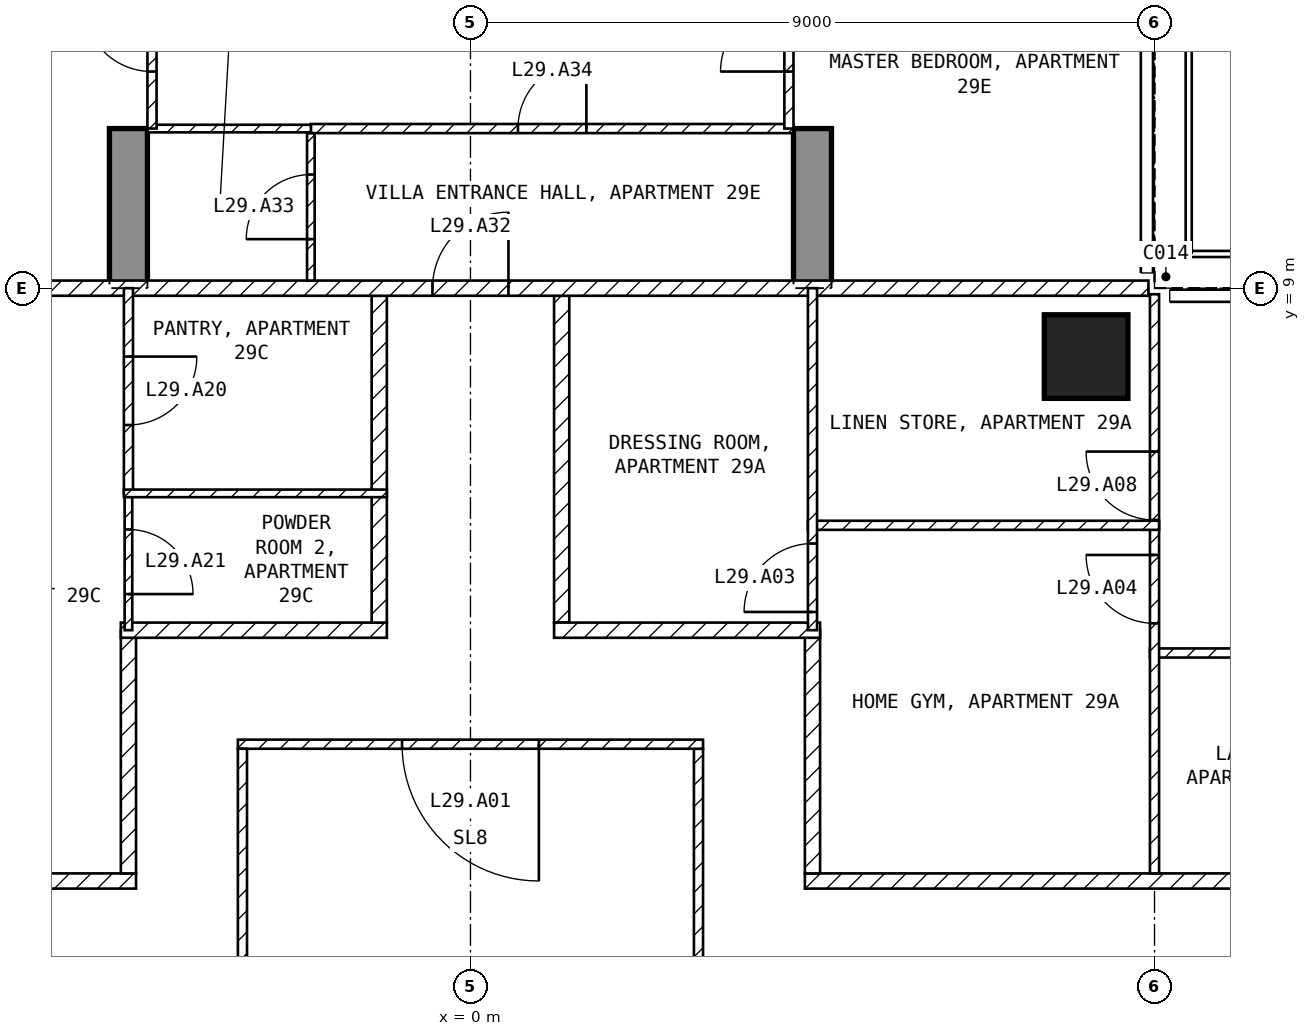
"""IFC4 building model, lengths in metres.
Left out: names, types, materials, properties, quantities, classifications, styles, units other than length and angle.
Written with IfcOpenShell. Run it as: python <this file> out.ifc"""

import sys

from ifc_helpers import new_model, si_unit, direction, frame, frame_2d, origin, origin_2d, place, context, subcontext, project, spatial, polyline, rectangle, outline, extrude, element, fill, save


model = new_model("IFC4")
c1 = context("Model", 3, precision=1e-05, world=origin(), true_north=direction((0.0, 1.0)))
c2 = subcontext(c1, "Body", "Model", "MODEL_VIEW")
j1 = project(units=[si_unit("LENGTHUNIT", "METRE"), si_unit("PLANEANGLEUNIT", "RADIAN")], contexts=[c1])
p1 = place(None, origin())
s1 = spatial("IfcSite", under=j1, at=p1, CompositionType="ELEMENT")
p2 = place(p1, origin())
s2 = spatial("IfcBuilding", under=s1, at=p2, CompositionType="ELEMENT")
p3 = place(p2, frame((0.0, 0.0, 123.4)))
s3 = spatial("IfcBuildingStorey", under=s2, at=p3, CompositionType="ELEMENT", Elevation=123.4)
p4 = place(p3, frame((8.1, 8.1, -0.25), z_axis=(0.0, 0.0, 1.0), x_axis=(1.0, 0.0, 0.0)))
e1 = element("IfcColumn", 1, at=p4, inside=s3, PredefinedType="COLUMN", context=c2, shape_type="SweptSolid", body=[
    extrude(rectangle(XDim=1.1, YDim=1.1, at=origin_2d()), origin(), (0.0, 0.0, 1.0), 3.5),
])
for number, where, z_axis, x_axis in (
    (2, (-4.75, 9.0, -0.25), (1.0, 0.0, 0.0), (0.0, 1.0, 0.0)),
    (3, (4.25, 9.0, -0.25), (1.0, 0.0, 0.0), (0.0, 1.0, 0.0)),
):
    element("IfcWall", number, at=place(p3, frame(where, z_axis=z_axis, x_axis=x_axis)), inside=s3, PredefinedType="SHEAR", context=c2, shape_type="SweptSolid", body=[
        extrude(outline(polyline([(0.0, 0.0), (2.1, 0.0), (2.1, 2.65), (4.5, 2.65), (4.5, 0.0), (9.9, 0.0), (9.9, 2.65), (12.3, 2.65), (12.3, 0.0), (16.55, 0.0), (16.55, 3.5), (0.0, 3.5), (0.0, 0.0)])), origin(), (0.0, 0.0, 1.0), 0.5),
    ])
p5 = place(p3, frame((3.0, -2.94, 0.0), z_axis=(0.0, 0.0, 1.0), x_axis=(0.0, 1.0, 0.0)))
e4 = element("IfcWall", 4, at=p5, inside=s3, PredefinedType="PARTITIONING", context=c2, shape_type="SweptSolid", body=[
    extrude(rectangle(XDim=5.88, YDim=0.12, at=frame_2d((2.94, 0.0))), origin(), (0.0, 0.0, 1.0), 3.25),
])
p6 = place(p3, frame((3.06, 3.0, 0.0), z_axis=(0.0, 0.0, 1.0), x_axis=(-1.0, 0.0, 0.0)))
e5 = element("IfcWall", 5, at=p6, inside=s3, PredefinedType="PARTITIONING", context=c2, shape_type="SweptSolid", body=[
    extrude(rectangle(XDim=6.12, YDim=0.12, at=frame_2d((3.06, 0.0))), origin(), (0.0, 0.0, 1.0), 3.25),
])
p7 = place(p6, frame((2.16, 0.0, 0.0)))
e6 = element("IfcOpeningElement", 6, at=p7, cuts=e5, PredefinedType="OPENING", context=c2, shape_type="SweptSolid", body=[
    extrude(rectangle(XDim=1.8, YDim=2.1, at=frame_2d((0.9, 1.05))), frame((0.0, 0.07, 0.0), z_axis=(0.0, -1.0, 0.0), x_axis=(1.0, 0.0, 0.0)), (0.0, 0.0, 1.0), 0.14),
])
p8 = place(p3, frame((-3.0, 2.94, 0.0), z_axis=(0.0, 0.0, 1.0), x_axis=(0.0, -1.0, 0.0)))
e7 = element("IfcWall", 7, at=p8, inside=s3, PredefinedType="PARTITIONING", context=c2, shape_type="SweptSolid", body=[
    extrude(rectangle(XDim=5.88, YDim=0.12, at=frame_2d((2.94, 0.0))), origin(), (0.0, 0.0, 1.0), 3.25),
])
p9 = place(p3, frame((4.4, 1.2, 0.0), z_axis=(0.0, 0.0, 1.0), x_axis=(1.0, 0.0, 0.0)))
e8 = element("IfcWall", 8, at=p9, inside=s3, PredefinedType="PARTITIONING", context=c2, shape_type="SweptSolid", body=[
    extrude(rectangle(XDim=17.2, YDim=0.2, at=frame_2d((8.6, 0.0))), origin(), (0.0, 0.0, 1.0), 3.25),
])
p10 = place(p9, frame((8.45, 0.0, 0.0)))
e9 = element("IfcOpeningElement", 9, at=p10, cuts=e8, PredefinedType="OPENING", context=c2, shape_type="SweptSolid", body=[
    extrude(rectangle(XDim=1.0, YDim=2.1, at=frame_2d((0.5, 1.05))), frame((0.0, 0.11, 0.0), z_axis=(0.0, -1.0, 0.0), x_axis=(1.0, 0.0, 0.0)), (0.0, 0.0, 1.0), 0.22),
])
p11 = place(p3, frame((4.5, 4.5, 0.0), z_axis=(0.0, 0.0, 1.0), x_axis=(0.0, -1.0, 0.0)))
e10 = element("IfcWall", 10, at=p11, inside=s3, PredefinedType="PARTITIONING", context=c2, shape_type="SweptSolid", body=[
    extrude(rectangle(XDim=3.2, YDim=0.2, at=frame_2d((1.6, 0.0))), origin(), (0.0, 0.0, 1.0), 3.25),
])
p12 = place(p3, frame((1.2, 8.9, 0.0), z_axis=(0.0, 0.0, 1.0), x_axis=(0.0, -1.0, 0.0)))
e11 = element("IfcWall", 11, at=p12, inside=s3, PredefinedType="PARTITIONING", context=c2, shape_type="SweptSolid", body=[
    extrude(rectangle(XDim=4.3, YDim=0.2, at=frame_2d((2.15, 0.0))), origin(), (0.0, 0.0, 1.0), 3.25),
])
p13 = place(p3, frame((1.1, 4.5, 0.0), z_axis=(0.0, 0.0, 1.0), x_axis=(1.0, 0.0, 0.0)))
e12 = element("IfcWall", 12, at=p13, inside=s3, PredefinedType="PARTITIONING", context=c2, shape_type="SweptSolid", body=[
    extrude(rectangle(XDim=3.5, YDim=0.2, at=frame_2d((1.75, 0.0))), origin(), (0.0, 0.0, 1.0), 3.25),
])
p14 = place(p3, frame((-21.6, 1.2, 0.0), z_axis=(0.0, 0.0, 1.0), x_axis=(1.0, 0.0, 0.0)))
e13 = element("IfcWall", 13, at=p14, inside=s3, PredefinedType="PARTITIONING", context=c2, shape_type="SweptSolid", body=[
    extrude(rectangle(XDim=17.2, YDim=0.2, at=frame_2d((8.6, 0.0))), origin(), (0.0, 0.0, 1.0), 3.25),
])
p15 = place(p14, frame((10.9, 0.0, 0.0)))
e14 = element("IfcOpeningElement", 14, at=p15, cuts=e13, PredefinedType="OPENING", context=c2, shape_type="SweptSolid", body=[
    extrude(rectangle(XDim=1.0, YDim=2.1, at=frame_2d((0.5, 1.05))), frame((0.0, 0.11, 0.0), z_axis=(0.0, -1.0, 0.0), x_axis=(1.0, 0.0, 0.0)), (0.0, 0.0, 1.0), 0.22),
])
p16 = place(p3, frame((-4.5, 1.3, 0.0), z_axis=(0.0, 0.0, 1.0), x_axis=(0.0, 1.0, 0.0)))
e15 = element("IfcWall", 15, at=p16, inside=s3, PredefinedType="PARTITIONING", context=c2, shape_type="SweptSolid", body=[
    extrude(rectangle(XDim=3.2, YDim=0.2, at=frame_2d((1.6, 0.0))), origin(), (0.0, 0.0, 1.0), 3.25),
])
p17 = place(p3, frame((-4.6, 4.5, 0.0), z_axis=(0.0, 0.0, 1.0), x_axis=(1.0, 0.0, 0.0)))
e16 = element("IfcWall", 16, at=p17, inside=s3, PredefinedType="PARTITIONING", context=c2, shape_type="SweptSolid", body=[
    extrude(rectangle(XDim=3.5, YDim=0.2, at=frame_2d((1.75, 0.0))), origin(), (0.0, 0.0, 1.0), 3.25),
])
p18 = place(p3, frame((-1.2, 4.6, 0.0), z_axis=(0.0, 0.0, 1.0), x_axis=(0.0, 1.0, 0.0)))
e17 = element("IfcWall", 17, at=p18, inside=s3, PredefinedType="PARTITIONING", context=c2, shape_type="SweptSolid", body=[
    extrude(rectangle(XDim=4.3, YDim=0.2, at=frame_2d((2.15, 0.0))), origin(), (0.0, 0.0, 1.0), 3.25),
])
p19 = place(p3, frame((-8.92, 9.0, 0.0), z_axis=(0.0, 0.0, 1.0), x_axis=(1.0, 0.0, 0.0)))
e18 = element("IfcWall", 18, at=p19, inside=s3, PredefinedType="PARTITIONING", context=c2, shape_type="SweptSolid", body=[
    extrude(rectangle(XDim=17.84, YDim=0.2, at=frame_2d((8.92, 0.0))), origin(), (0.0, 0.0, 1.0), 3.25),
])
p20 = place(p19, frame((8.42, 0.0, 0.0)))
e19 = element("IfcOpeningElement", 19, at=p20, cuts=e18, PredefinedType="OPENING", context=c2, shape_type="SweptSolid", body=[
    extrude(rectangle(XDim=1.0, YDim=2.1, at=frame_2d((0.5, 1.05))), frame((0.0, 0.11, 0.0), z_axis=(0.0, -1.0, 0.0), x_axis=(1.0, 0.0, 0.0)), (0.0, 0.0, 1.0), 0.22),
])
p21 = place(p3, frame((8.94, 4.2, 0.0), z_axis=(0.0, 0.0, 1.0), x_axis=(1.0, 0.0, 0.0)))
e20 = element("IfcWall", 20, at=p21, inside=s3, PredefinedType="PARTITIONING", context=c2, shape_type="SweptSolid", body=[
    extrude(rectangle(XDim=10.71, YDim=0.12, at=frame_2d((5.355, 0.0))), origin(), (0.0, 0.0, 1.0), 3.25),
])
p22 = place(p21, frame((3.96, 0.0, 0.0)))
e21 = element("IfcOpeningElement", 21, at=p22, cuts=e20, PredefinedType="OPENING", context=c2, shape_type="SweptSolid", body=[
    extrude(rectangle(XDim=0.9, YDim=2.1, at=frame_2d((0.45, 1.05))), frame((0.0, 0.07, 0.0), z_axis=(0.0, -1.0, 0.0), x_axis=(1.0, 0.0, 0.0)), (0.0, 0.0, 1.0), 0.14),
])
p23 = place(p3, frame((9.0, 1.3, 0.0), z_axis=(0.0, 0.0, 1.0), x_axis=(0.0, 1.0, 0.0)))
e22 = element("IfcWall", 22, at=p23, inside=s3, PredefinedType="PARTITIONING", context=c2, shape_type="SweptSolid", body=[
    extrude(rectangle(XDim=7.62, YDim=0.12, at=frame_2d((3.81, 0.0))), origin(), (0.0, 0.0, 1.0), 3.25),
])
p24 = place(p23, frame((3.29, 0.0, 0.0)))
e23 = element("IfcOpeningElement", 23, at=p24, cuts=e22, PredefinedType="OPENING", context=c2, shape_type="SweptSolid", body=[
    extrude(rectangle(XDim=0.9, YDim=2.1, at=frame_2d((0.45, 1.05))), frame((0.0, 0.07, 0.0), z_axis=(0.0, -1.0, 0.0), x_axis=(1.0, 0.0, 0.0)), (0.0, 0.0, 1.0), 0.14),
])
p25 = place(p23, frame((4.65, 0.0, 0.0)))
e24 = element("IfcOpeningElement", 24, at=p25, cuts=e22, PredefinedType="OPENING", context=c2, shape_type="SweptSolid", body=[
    extrude(rectangle(XDim=0.9, YDim=2.1, at=frame_2d((0.45, 1.05))), frame((0.0, 0.07, 0.0), z_axis=(0.0, -1.0, 0.0), x_axis=(1.0, 0.0, 0.0)), (0.0, 0.0, 1.0), 0.14),
])
p26 = place(p3, frame((4.44, 5.88, 0.0), z_axis=(0.0, 0.0, 1.0), x_axis=(1.0, 0.0, 0.0)))
e25 = element("IfcWall", 25, at=p26, inside=s3, PredefinedType="PARTITIONING", context=c2, shape_type="SweptSolid", body=[
    extrude(rectangle(XDim=4.62, YDim=0.12, at=frame_2d((2.31, 0.0))), origin(), (0.0, 0.0, 1.0), 3.25),
])
p27 = place(p3, frame((4.5, 4.5, 0.0), z_axis=(0.0, 0.0, 1.0), x_axis=(0.0, 1.0, 0.0)))
e26 = element("IfcWall", 26, at=p27, inside=s3, PredefinedType="PARTITIONING", context=c2, shape_type="SweptSolid", body=[
    extrude(rectangle(XDim=4.5, YDim=0.12, at=frame_2d((2.25, 0.0))), origin(), (0.0, 0.0, 1.0), 3.25),
])
p28 = place(p27, frame((0.24, 0.0, 0.0)))
e27 = element("IfcOpeningElement", 27, at=p28, cuts=e26, PredefinedType="OPENING", context=c2, shape_type="SweptSolid", body=[
    extrude(rectangle(XDim=0.9, YDim=2.1, at=frame_2d((0.45, 1.05))), frame((0.0, 0.07, 0.0), z_axis=(0.0, -1.0, 0.0), x_axis=(1.0, 0.0, 0.0)), (0.0, 0.0, 1.0), 0.14),
])
p29 = place(p3, frame((-4.5, 6.3, 0.0), z_axis=(0.0, 0.0, 1.0), x_axis=(0.0, -1.0, 0.0)))
e28 = element("IfcWall", 28, at=p29, inside=s3, PredefinedType="PARTITIONING", context=c2, shape_type="SweptSolid", body=[
    extrude(rectangle(XDim=1.8, YDim=0.1, at=frame_2d((0.9, 0.0))), origin(), (0.0, 0.0, 1.0), 3.25),
])
p30 = place(p29, frame((0.475, 0.0, 0.0)))
e29 = element("IfcOpeningElement", 29, at=p30, cuts=e28, PredefinedType="OPENING", context=c2, shape_type="SweptSolid", body=[
    extrude(rectangle(XDim=0.85, YDim=2.1, at=frame_2d((0.425, 1.05))), frame((0.0, 0.06, 0.0), z_axis=(0.0, -1.0, 0.0), x_axis=(1.0, 0.0, 0.0)), (0.0, 0.0, 1.0), 0.12),
])
p31 = place(p3, frame((-4.5, 9.0, 0.0), z_axis=(0.0, 0.0, 1.0), x_axis=(0.0, -1.0, 0.0)))
e30 = element("IfcWall", 30, at=p31, inside=s3, PredefinedType="PARTITIONING", context=c2, shape_type="SweptSolid", body=[
    extrude(rectangle(XDim=2.7, YDim=0.12, at=frame_2d((1.35, 0.0))), origin(), (0.0, 0.0, 1.0), 3.25),
])
p32 = place(p31, frame((0.9, 0.0, 0.0)))
e31 = element("IfcOpeningElement", 31, at=p32, cuts=e30, PredefinedType="OPENING", context=c2, shape_type="SweptSolid", body=[
    extrude(rectangle(XDim=0.9, YDim=2.1, at=frame_2d((0.45, 1.05))), frame((0.0, 0.07, 0.0), z_axis=(0.0, -1.0, 0.0), x_axis=(1.0, 0.0, 0.0)), (0.0, 0.0, 1.0), 0.14),
])
p33 = place(p3, frame((-4.56, 6.3, 0.0), z_axis=(0.0, 0.0, 1.0), x_axis=(1.0, 0.0, 0.0)))
e32 = element("IfcWall", 32, at=p33, inside=s3, PredefinedType="PARTITIONING", context=c2, shape_type="SweptSolid", body=[
    extrude(rectangle(XDim=3.46, YDim=0.1, at=frame_2d((1.73, 0.0))), origin(), (0.0, 0.0, 1.0), 3.25),
])
p34 = place(p3, frame((-2.1, 9.1, 0.0), z_axis=(0.0, 0.0, 1.0), x_axis=(0.0, 1.0, 0.0)))
e33 = element("IfcWall", 33, at=p34, inside=s3, PredefinedType="PARTITIONING", context=c2, shape_type="SweptSolid", body=[
    extrude(rectangle(XDim=1.94, YDim=0.1, at=frame_2d((0.97, 0.0))), origin(), (0.0, 0.0, 1.0), 3.25),
])
p35 = place(p34, frame((0.545, 0.0, 0.0)))
e34 = element("IfcOpeningElement", 34, at=p35, cuts=e33, PredefinedType="OPENING", context=c2, shape_type="SweptSolid", body=[
    extrude(rectangle(XDim=0.85, YDim=2.1, at=frame_2d((0.425, 1.05))), frame((0.0, 0.06, 0.0), z_axis=(0.0, -1.0, 0.0), x_axis=(1.0, 0.0, 0.0)), (0.0, 0.0, 1.0), 0.12),
])
p36 = place(p3, frame((-2.1, 11.1, 0.0), z_axis=(0.0, 0.0, 1.0), x_axis=(1.0, 0.0, 0.0)))
e35 = element("IfcWall", 35, at=p36, inside=s3, PredefinedType="PARTITIONING", context=c2, shape_type="SweptSolid", body=[
    extrude(rectangle(XDim=6.35, YDim=0.12, at=frame_2d((3.175, 0.0))), origin(), (0.0, 0.0, 1.0), 3.25),
])
p37 = place(p36, frame((2.725, 0.0, 0.0)))
e36 = element("IfcOpeningElement", 36, at=p37, cuts=e35, PredefinedType="OPENING", context=c2, shape_type="SweptSolid", body=[
    extrude(rectangle(XDim=0.9, YDim=2.1, at=frame_2d((0.45, 1.05))), frame((0.0, 0.07, 0.0), z_axis=(0.0, -1.0, 0.0), x_axis=(1.0, 0.0, 0.0)), (0.0, 0.0, 1.0), 0.14),
])
p38 = place(p3, frame((-4.25, 11.1, 0.0), z_axis=(0.0, 0.0, 1.0), x_axis=(1.0, 0.0, 0.0)))
e37 = element("IfcWall", 37, at=p38, inside=s3, PredefinedType="PARTITIONING", context=c2, shape_type="SweptSolid", body=[
    extrude(rectangle(XDim=2.15, YDim=0.1, at=frame_2d((1.075, 0.0))), origin(), (0.0, 0.0, 1.0), 3.25),
])
p39 = place(p3, frame((4.19, 11.1, 0.0), z_axis=(0.0, 0.0, 1.0), x_axis=(0.0, 1.0, 0.0)))
e38 = element("IfcWall", 38, at=p39, inside=s3, PredefinedType="PARTITIONING", context=c2, shape_type="SweptSolid", body=[
    extrude(rectangle(XDim=2.4, YDim=0.12, at=frame_2d((1.2, 0.0))), origin(), (0.0, 0.0, 1.0), 2.4),
])
p40 = place(p39, frame((0.75, 0.0, 0.0)))
e39 = element("IfcOpeningElement", 39, at=p40, cuts=e38, PredefinedType="OPENING", context=c2, shape_type="SweptSolid", body=[
    extrude(rectangle(XDim=0.9, YDim=2.1, at=frame_2d((0.45, 1.05))), frame((0.0, 0.07, 0.0), z_axis=(0.0, -1.0, 0.0), x_axis=(1.0, 0.0, 0.0)), (0.0, 0.0, 1.0), 0.14),
])
p41 = place(p3, frame((-4.19, 11.1, 0.0), z_axis=(0.0, 0.0, 1.0), x_axis=(0.0, 1.0, 0.0)))
e40 = element("IfcWall", 40, at=p41, inside=s3, PredefinedType="PARTITIONING", context=c2, shape_type="SweptSolid", body=[
    extrude(rectangle(XDim=2.4, YDim=0.12, at=frame_2d((1.2, 0.0))), origin(), (0.0, 0.0, 1.0), 2.4),
])
p42 = place(p41, frame((0.75, 0.0, 0.0)))
e41 = element("IfcOpeningElement", 41, at=p42, cuts=e40, PredefinedType="OPENING", context=c2, shape_type="SweptSolid", body=[
    extrude(rectangle(XDim=0.9, YDim=2.1, at=frame_2d((0.45, 1.05))), frame((0.0, 0.07, 0.0), z_axis=(0.0, -1.0, 0.0), x_axis=(1.0, 0.0, 0.0)), (0.0, 0.0, 1.0), 0.14),
])
p43 = place(p7, origin())
e42 = element("IfcDoor", 42, at=p43, inside=s3, OperationType="SINGLE_SWING_LEFT", PredefinedType="DOOR", context=c2, shape_type="SweptSolid", body=[
    extrude(rectangle(XDim=1.8, YDim=2.1, at=frame_2d((0.9, 1.05))), frame((0.0, 0.025, 0.0), z_axis=(0.0, -1.0, 0.0), x_axis=(1.0, 0.0, 0.0)), (0.0, 0.0, 1.0), 0.05),
])
fill(e6, e42)
p44 = place(p28, origin())
e43 = element("IfcDoor", 43, at=p44, inside=s3, OperationType="SINGLE_SWING_LEFT", PredefinedType="DOOR", context=c2, shape_type="SweptSolid", body=[
    extrude(rectangle(XDim=0.9, YDim=2.1, at=frame_2d((0.45, 1.05))), frame((0.0, 0.025, 0.0), z_axis=(0.0, -1.0, 0.0), x_axis=(1.0, 0.0, 0.0)), (0.0, 0.0, 1.0), 0.05),
])
fill(e27, e43)
p45 = place(p24, origin())
e44 = element("IfcDoor", 44, at=p45, inside=s3, OperationType="SINGLE_SWING_RIGHT", PredefinedType="DOOR", context=c2, shape_type="SweptSolid", body=[
    extrude(rectangle(XDim=0.9, YDim=2.1, at=frame_2d((0.45, 1.05))), frame((0.0, 0.025, 0.0), z_axis=(0.0, -1.0, 0.0), x_axis=(1.0, 0.0, 0.0)), (0.0, 0.0, 1.0), 0.05),
])
fill(e23, e44)
p46 = place(p25, origin())
e45 = element("IfcDoor", 45, at=p46, inside=s3, OperationType="SINGLE_SWING_RIGHT", PredefinedType="DOOR", context=c2, shape_type="SweptSolid", body=[
    extrude(rectangle(XDim=0.9, YDim=2.1, at=frame_2d((0.45, 1.05))), frame((0.0, 0.025, 0.0), z_axis=(0.0, -1.0, 0.0), x_axis=(1.0, 0.0, 0.0)), (0.0, 0.0, 1.0), 0.05),
])
fill(e24, e45)
p47 = place(p32, origin())
e46 = element("IfcDoor", 46, at=p47, inside=s3, OperationType="SINGLE_SWING_LEFT", PredefinedType="DOOR", context=c2, shape_type="SweptSolid", body=[
    extrude(rectangle(XDim=0.9, YDim=2.1, at=frame_2d((0.45, 1.05))), frame((0.0, 0.025, 0.0), z_axis=(0.0, -1.0, 0.0), x_axis=(1.0, 0.0, 0.0)), (0.0, 0.0, 1.0), 0.05),
])
fill(e31, e46)
p48 = place(p30, origin())
e47 = element("IfcDoor", 47, at=p48, inside=s3, OperationType="SINGLE_SWING_RIGHT", PredefinedType="DOOR", context=c2, shape_type="SweptSolid", body=[
    extrude(rectangle(XDim=0.85, YDim=2.1, at=frame_2d((0.425, 1.05))), frame((0.0, 0.025, 0.0), z_axis=(0.0, -1.0, 0.0), x_axis=(1.0, 0.0, 0.0)), (0.0, 0.0, 1.0), 0.05),
])
fill(e29, e47)
p49 = place(p20, origin())
e48 = element("IfcDoor", 48, at=p49, inside=s3, OperationType="SINGLE_SWING_RIGHT", PredefinedType="DOOR", context=c2, shape_type="SweptSolid", body=[
    extrude(rectangle(XDim=1.0, YDim=2.1, at=frame_2d((0.5, 1.05))), frame((0.0, 0.025, 0.0), z_axis=(0.0, -1.0, 0.0), x_axis=(1.0, 0.0, 0.0)), (0.0, 0.0, 1.0), 0.05),
])
fill(e19, e48)
p50 = place(p35, origin())
e49 = element("IfcDoor", 49, at=p50, inside=s3, OperationType="SINGLE_SWING_LEFT", PredefinedType="DOOR", context=c2, shape_type="SweptSolid", body=[
    extrude(rectangle(XDim=0.85, YDim=2.1, at=frame_2d((0.425, 1.05))), frame((0.0, 0.025, 0.0), z_axis=(0.0, -1.0, 0.0), x_axis=(1.0, 0.0, 0.0)), (0.0, 0.0, 1.0), 0.05),
])
fill(e34, e49)
p51 = place(p37, origin())
e50 = element("IfcDoor", 50, at=p51, inside=s3, OperationType="SINGLE_SWING_RIGHT", PredefinedType="DOOR", context=c2, shape_type="SweptSolid", body=[
    extrude(rectangle(XDim=0.9, YDim=2.1, at=frame_2d((0.45, 1.05))), frame((0.0, 0.025, 0.0), z_axis=(0.0, -1.0, 0.0), x_axis=(1.0, 0.0, 0.0)), (0.0, 0.0, 1.0), 0.05),
])
fill(e36, e50)
p52 = place(p40, origin())
e51 = element("IfcDoor", 51, at=p52, inside=s3, OperationType="SINGLE_SWING_LEFT", PredefinedType="DOOR", context=c2, shape_type="SweptSolid", body=[
    extrude(rectangle(XDim=0.9, YDim=2.1, at=frame_2d((0.45, 1.05))), frame((0.0, 0.025, 0.0), z_axis=(0.0, -1.0, 0.0), x_axis=(1.0, 0.0, 0.0)), (0.0, 0.0, 1.0), 0.05),
])
fill(e39, e51)
p53 = place(p42, origin())
e52 = element("IfcDoor", 52, at=p53, inside=s3, OperationType="SINGLE_SWING_RIGHT", PredefinedType="DOOR", context=c2, shape_type="SweptSolid", body=[
    extrude(rectangle(XDim=0.9, YDim=2.1, at=frame_2d((0.45, 1.05))), frame((0.0, 0.025, 0.0), z_axis=(0.0, -1.0, 0.0), x_axis=(1.0, 0.0, 0.0)), (0.0, 0.0, 1.0), 0.05),
])
fill(e41, e52)
save(model, sys.argv[1])
